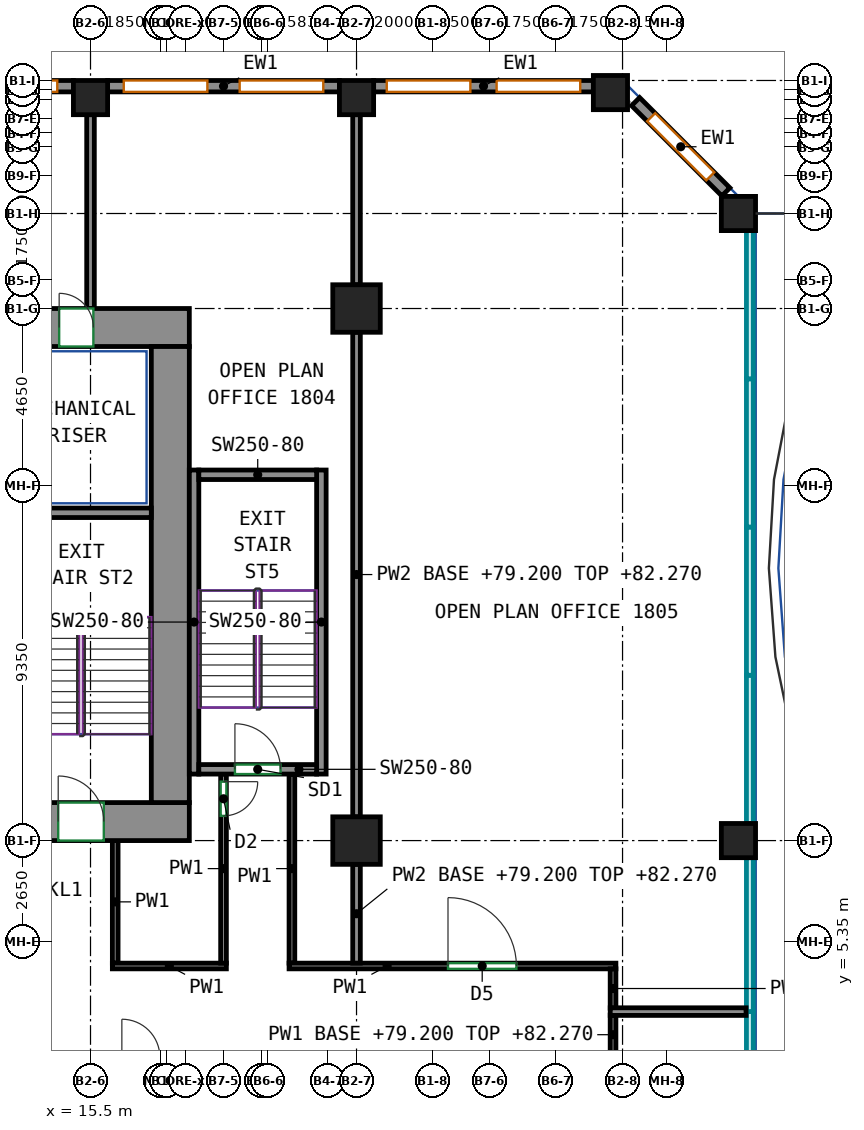
"""IFC4 building model, lengths in metres.
Left out: names, types, materials, properties, quantities, classifications, styles, units other than length and angle.
Written with IfcOpenShell. Run it as: python <this file> out.ifc"""

import sys

from ifc_helpers import new_model, si_unit, direction, frame, frame_2d, origin, origin_2d, place, context, subcontext, project, spatial, rectangle, extrude, source, transform, mapped, element, fill, save


model = new_model("IFC4")
c1 = context("Model", 3, precision=1e-05, world=origin(), true_north=direction((0.0, 1.0)))
c2 = subcontext(c1, "Body", "Model", "MODEL_VIEW")
j1 = project(units=[si_unit("LENGTHUNIT", "METRE"), si_unit("PLANEANGLEUNIT", "RADIAN")], contexts=[c1])
p1 = place(None, origin())
s1 = spatial("IfcSite", under=j1, at=p1, CompositionType="ELEMENT")
p2 = place(p1, origin())
s2 = spatial("IfcBuilding", under=s1, at=p2, CompositionType="ELEMENT")
p3 = place(p2, frame((0.0, 0.0, 79.2)))
s3 = spatial("IfcBuildingStorey", under=s2, at=p3, CompositionType="ELEMENT", Elevation=79.2)
m1 = source(origin(), c2, "Body", "SweptSolid", [
    extrude(rectangle(XDim=0.9, YDim=0.9, at=origin_2d()), origin(), (0.0, 0.0, 1.0), 3.72),
])
p4 = place(p3, frame((15.5, 27.55, 0.0), z_axis=(0.0, 0.0, 1.0), x_axis=(1.0, 0.0, 0.0)))
e1 = element("IfcColumn", 1, at=p4, inside=s3, PredefinedType="COLUMN", context=c2, shape_type="MappedRepresentation", body=[
    mapped(m1, transform((0.0, 0.0, 0.0))),
])
m2 = source(origin(), c2, "Body", "SweptSolid", [
    extrude(rectangle(XDim=1.25, YDim=1.25, at=origin_2d()), origin(), (0.0, 0.0, 1.0), 3.72),
])
for number, where, z_axis, x_axis in (
    (2, (22.5, 8.0, 0.0), (0.0, 0.0, 1.0), (1.0, 0.0, 0.0)),
    (3, (22.5, 22.0, 0.0), (0.0, 0.0, 1.0), (1.0, 0.0, 0.0)),
):
    element("IfcColumn", number, at=place(p3, frame(where, z_axis=z_axis, x_axis=x_axis)), inside=s3, PredefinedType="COLUMN", context=c2, shape_type="MappedRepresentation", body=[
        mapped(m2, transform((0.0, 0.0, 0.0))),
    ])
for number, where, z_axis, x_axis in (
    (4, (22.5, 27.55, 0.0), (0.0, 0.0, 1.0), (1.0, 0.0, 0.0)),
    (5, (29.182, 27.682, 0.0), (0.0, 0.0, 1.0), (1.0, 0.0, 0.0)),
    (6, (32.55, 8.0, 0.0), (0.0, 0.0, 1.0), (1.0, 0.0, 0.0)),
    (7, (32.55, 24.5, 0.0), (0.0, 0.0, 1.0), (1.0, 0.0, 0.0)),
):
    element("IfcColumn", number, at=place(p3, frame(where, z_axis=z_axis, x_axis=x_axis)), inside=s3, PredefinedType="COLUMN", context=c2, shape_type="MappedRepresentation", body=[
        mapped(m1, transform((0.0, 0.0, 0.0))),
    ])
m3 = source(origin(), c2, "Body", "SweptSolid", [
    extrude(rectangle(XDim=5.63, YDim=1.0, at=frame_2d((2.815, 0.0))), origin(), (0.0, 0.0, 1.0), 3.72),
])
p5 = place(p3, frame((12.47, 8.5, 0.0), z_axis=(0.0, 0.0, 1.0), x_axis=(1.0, 0.0, 0.0)))
e8 = element("IfcWall", 8, at=p5, inside=s3, PredefinedType="SHEAR", context=c2, shape_type="MappedRepresentation", body=[
    mapped(m3, transform((0.0, 0.0, 0.0))),
])
p6 = place(p5, frame((2.18, 0.0, 0.0)))
e9 = element("IfcOpeningElement", 9, at=p6, cuts=e8, PredefinedType="OPENING", context=c2, shape_type="SweptSolid", body=[
    extrude(rectangle(XDim=1.2, YDim=2.1, at=frame_2d((0.6, 1.05))), frame((0.0, 0.51, 0.0), z_axis=(0.0, -1.0, 0.0), x_axis=(1.0, 0.0, 0.0)), (0.0, 0.0, 1.0), 1.02),
])
m4 = source(origin(), c2, "Body", "SweptSolid", [
    extrude(rectangle(XDim=34.1, YDim=1.0, at=frame_2d((17.05, 0.0))), origin(), (0.0, 0.0, 1.0), 3.72),
])
p7 = place(p3, frame((-16.0, 21.5, 0.0), z_axis=(0.0, 0.0, 1.0), x_axis=(1.0, 0.0, 0.0)))
e10 = element("IfcWall", 10, at=p7, inside=s3, PredefinedType="SHEAR", context=c2, shape_type="MappedRepresentation", body=[
    mapped(m4, transform((0.0, 0.0, 0.0))),
])
p8 = place(p7, frame((8.52, 0.0, 0.0)))
e11 = element("IfcOpeningElement", 11, at=p8, cuts=e10, PredefinedType="OPENING", context=c2, shape_type="SweptSolid", body=[
    extrude(rectangle(XDim=0.9, YDim=2.1, at=frame_2d((0.45, 1.05))), frame((0.0, 0.51, 0.0), z_axis=(0.0, -1.0, 0.0), x_axis=(1.0, 0.0, 0.0)), (0.0, 0.0, 1.0), 1.02),
])
p9 = place(p7, frame((14.55, 0.0, 0.0)))
e12 = element("IfcOpeningElement", 12, at=p9, cuts=e10, PredefinedType="OPENING", context=c2, shape_type="SweptSolid", body=[
    extrude(rectangle(XDim=0.9, YDim=2.1, at=frame_2d((0.45, 1.05))), frame((0.0, 0.51, 0.0), z_axis=(0.0, -1.0, 0.0), x_axis=(1.0, 0.0, 0.0)), (0.0, 0.0, 1.0), 1.02),
])
p10 = place(p7, frame((19.374, 0.0, 0.0)))
e13 = element("IfcOpeningElement", 13, at=p10, cuts=e10, PredefinedType="OPENING", context=c2, shape_type="SweptSolid", body=[
    extrude(rectangle(XDim=0.9, YDim=2.1, at=frame_2d((0.45, 1.05))), frame((0.0, 0.51, 0.0), z_axis=(0.0, -1.0, 0.0), x_axis=(1.0, 0.0, 0.0)), (0.0, 0.0, 1.0), 1.02),
])
p11 = place(p7, frame((25.404, 0.0, 0.0)))
e14 = element("IfcOpeningElement", 14, at=p11, cuts=e10, PredefinedType="OPENING", context=c2, shape_type="SweptSolid", body=[
    extrude(rectangle(XDim=0.9, YDim=2.1, at=frame_2d((0.45, 1.05))), frame((0.0, 0.51, 0.0), z_axis=(0.0, -1.0, 0.0), x_axis=(1.0, 0.0, 0.0)), (0.0, 0.0, 1.0), 1.02),
])
p12 = place(p7, frame((2.525, 0.0, 0.0)))
e15 = element("IfcOpeningElement", 15, at=p12, cuts=e10, PredefinedType="OPENING", context=c2, shape_type="SweptSolid", body=[
    extrude(rectangle(XDim=0.9, YDim=2.1, at=frame_2d((0.45, 1.05))), frame((0.0, 0.51, 0.0), z_axis=(0.0, -1.0, 0.0), x_axis=(1.0, 0.0, 0.0)), (0.0, 0.0, 1.0), 1.02),
])
p13 = place(p7, frame((30.675, 0.0, 0.0)))
e16 = element("IfcOpeningElement", 16, at=p13, cuts=e10, PredefinedType="OPENING", context=c2, shape_type="SweptSolid", body=[
    extrude(rectangle(XDim=0.9, YDim=2.1, at=frame_2d((0.45, 1.05))), frame((0.0, 0.51, 0.0), z_axis=(0.0, -1.0, 0.0), x_axis=(1.0, 0.0, 0.0)), (0.0, 0.0, 1.0), 1.02),
])
m5 = source(origin(), c2, "Body", "SweptSolid", [
    extrude(rectangle(XDim=12.0, YDim=1.0, at=frame_2d((6.0, 0.0))), origin(), (0.0, 0.0, 1.0), 3.72),
])
p14 = place(p3, frame((17.6, 9.0, 0.0), z_axis=(0.0, 0.0, 1.0), x_axis=(0.0, 1.0, 0.0)))
e17 = element("IfcWall", 17, at=p14, inside=s3, PredefinedType="SHEAR", context=c2, shape_type="MappedRepresentation", body=[
    mapped(m5, transform((0.0, 0.0, 0.0))),
])
m6 = source(origin(), c2, "Body", "SweptSolid", [
    extrude(rectangle(XDim=3.7, YDim=0.25, at=frame_2d((1.85, 0.0))), origin(), (0.0, 0.0, 1.0), 3.72),
])
p15 = place(p3, frame((13.4, 16.625, 0.0), z_axis=(0.0, 0.0, 1.0), x_axis=(1.0, 0.0, 0.0)))
e18 = element("IfcWall", 18, at=p15, inside=s3, PredefinedType="SHEAR", context=c2, shape_type="MappedRepresentation", body=[
    mapped(m6, transform((0.0, 0.0, 0.0))),
])
m7 = source(origin(), c2, "Body", "SweptSolid", [
    extrude(rectangle(XDim=8.0, YDim=0.25, at=frame_2d((4.0, 0.0))), origin(), (0.0, 0.0, 1.0), 3.72),
])
for number, where, z_axis, x_axis in (
    (19, (18.225, 9.75, 0.0), (0.0, 0.0, 1.0), (0.0, 1.0, 0.0)),
    (20, (21.575, 9.75, 0.0), (0.0, 0.0, 1.0), (0.0, 1.0, 0.0)),
):
    element("IfcWall", number, at=place(p3, frame(where, z_axis=z_axis, x_axis=x_axis)), inside=s3, PredefinedType="SHEAR", context=c2, shape_type="MappedRepresentation", body=[
        mapped(m7, transform((0.0, 0.0, 0.0))),
    ])
m8 = source(origin(), c2, "Body", "SweptSolid", [
    extrude(rectangle(XDim=3.1, YDim=0.25, at=frame_2d((1.55, 0.0))), origin(), (0.0, 0.0, 1.0), 3.72),
])
p16 = place(p3, frame((18.35, 9.875, 0.0), z_axis=(0.0, 0.0, 1.0), x_axis=(1.0, 0.0, 0.0)))
e21 = element("IfcWall", 21, at=p16, inside=s3, PredefinedType="SHEAR", context=c2, shape_type="MappedRepresentation", body=[
    mapped(m8, transform((0.0, 0.0, 0.0))),
])
p17 = place(p16, frame((0.95, 0.0, 0.0)))
e22 = element("IfcOpeningElement", 22, at=p17, cuts=e21, PredefinedType="OPENING", context=c2, shape_type="SweptSolid", body=[
    extrude(rectangle(XDim=1.2, YDim=2.1, at=frame_2d((0.6, 1.05))), frame((0.0, 0.135, 0.0), z_axis=(0.0, -1.0, 0.0), x_axis=(1.0, 0.0, 0.0)), (0.0, 0.0, 1.0), 0.27),
])
p18 = place(p3, frame((18.35, 17.625, 0.0), z_axis=(0.0, 0.0, 1.0), x_axis=(1.0, 0.0, 0.0)))
e23 = element("IfcWall", 23, at=p18, inside=s3, PredefinedType="SHEAR", context=c2, shape_type="MappedRepresentation", body=[
    mapped(m8, transform((0.0, 0.0, 0.0))),
])
m9 = source(origin(), c2, "Body", "SweptSolid", [
    extrude(rectangle(XDim=3.359, YDim=0.3, at=frame_2d((1.679, 0.0))), origin(), (0.0, 0.0, 1.0), 3.72),
])
p19 = place(p3, frame((32.219, 25.069, 0.0), z_axis=(0.0, 0.0, 1.0), x_axis=(-0.707070438228, 0.707143122278, 0.0)))
e24 = element("IfcWall", 24, at=p19, inside=s3, PredefinedType="SOLIDWALL", context=c2, shape_type="MappedRepresentation", body=[
    mapped(m9, transform((0.0, 0.0, 0.0))),
])
p20 = place(p19, frame((0.579, 0.0, 0.7)))
e25 = element("IfcOpeningElement", 25, at=p20, cuts=e24, PredefinedType="OPENING", context=c2, shape_type="SweptSolid", body=[
    extrude(rectangle(XDim=2.2, YDim=2.25, at=frame_2d((1.1, 1.125))), frame((0.0, 0.16, 0.0), z_axis=(0.0, -1.0, 0.0), x_axis=(1.0, 0.0, 0.0)), (0.0, 0.0, 1.0), 0.32),
])
m10 = source(origin(), c2, "Body", "SweptSolid", [
    extrude(rectangle(XDim=5.782, YDim=0.3, at=frame_2d((2.891, 0.0))), origin(), (0.0, 0.0, 1.0), 3.72),
])
p21 = place(p3, frame((28.732, 27.85, 0.0), z_axis=(0.0, 0.0, 1.0), x_axis=(-1.0, 0.0, 0.0)))
e26 = element("IfcWall", 26, at=p21, inside=s3, PredefinedType="SOLIDWALL", context=c2, shape_type="MappedRepresentation", body=[
    mapped(m10, transform((0.0, 0.0, 0.0))),
])
p22 = place(p21, frame((0.345, 0.0, 0.7)))
e27 = element("IfcOpeningElement", 27, at=p22, cuts=e26, PredefinedType="OPENING", context=c2, shape_type="SweptSolid", body=[
    extrude(rectangle(XDim=2.2, YDim=2.25, at=frame_2d((1.1, 1.125))), frame((0.0, 0.16, 0.0), z_axis=(0.0, -1.0, 0.0), x_axis=(1.0, 0.0, 0.0)), (0.0, 0.0, 1.0), 0.32),
])
p23 = place(p21, frame((3.236, 0.0, 0.7)))
e28 = element("IfcOpeningElement", 28, at=p23, cuts=e26, PredefinedType="OPENING", context=c2, shape_type="SweptSolid", body=[
    extrude(rectangle(XDim=2.2, YDim=2.25, at=frame_2d((1.1, 1.125))), frame((0.0, 0.16, 0.0), z_axis=(0.0, -1.0, 0.0), x_axis=(1.0, 0.0, 0.0)), (0.0, 0.0, 1.0), 0.32),
])
m11 = source(origin(), c2, "Body", "SweptSolid", [
    extrude(rectangle(XDim=6.1, YDim=0.3, at=frame_2d((3.05, 0.0))), origin(), (0.0, 0.0, 1.0), 3.72),
])
p24 = place(p3, frame((22.05, 27.85, 0.0), z_axis=(0.0, 0.0, 1.0), x_axis=(-1.0, 0.0, 0.0)))
e29 = element("IfcWall", 29, at=p24, inside=s3, PredefinedType="SOLIDWALL", context=c2, shape_type="MappedRepresentation", body=[
    mapped(m11, transform((0.0, 0.0, 0.0))),
])
p25 = place(p24, frame((0.425, 0.0, 0.7)))
e30 = element("IfcOpeningElement", 30, at=p25, cuts=e29, PredefinedType="OPENING", context=c2, shape_type="SweptSolid", body=[
    extrude(rectangle(XDim=2.2, YDim=2.25, at=frame_2d((1.1, 1.125))), frame((0.0, 0.16, 0.0), z_axis=(0.0, -1.0, 0.0), x_axis=(1.0, 0.0, 0.0)), (0.0, 0.0, 1.0), 0.32),
])
p26 = place(p24, frame((3.475, 0.0, 0.7)))
e31 = element("IfcOpeningElement", 31, at=p26, cuts=e29, PredefinedType="OPENING", context=c2, shape_type="SweptSolid", body=[
    extrude(rectangle(XDim=2.2, YDim=2.25, at=frame_2d((1.1, 1.125))), frame((0.0, 0.16, 0.0), z_axis=(0.0, -1.0, 0.0), x_axis=(1.0, 0.0, 0.0)), (0.0, 0.0, 1.0), 0.32),
])
p27 = place(p3, frame((15.05, 27.85, 0.0), z_axis=(0.0, 0.0, 1.0), x_axis=(-1.0, 0.0, 0.0)))
e32 = element("IfcWall", 32, at=p27, inside=s3, PredefinedType="SOLIDWALL", context=c2, shape_type="MappedRepresentation", body=[
    mapped(m11, transform((0.0, 0.0, 0.0))),
])
p28 = place(p27, frame((0.425, 0.0, 0.7)))
e33 = element("IfcOpeningElement", 33, at=p28, cuts=e32, PredefinedType="OPENING", context=c2, shape_type="SweptSolid", body=[
    extrude(rectangle(XDim=2.2, YDim=2.25, at=frame_2d((1.1, 1.125))), frame((0.0, 0.16, 0.0), z_axis=(0.0, -1.0, 0.0), x_axis=(1.0, 0.0, 0.0)), (0.0, 0.0, 1.0), 0.32),
])
p29 = place(p27, frame((3.475, 0.0, 0.7)))
e34 = element("IfcOpeningElement", 34, at=p29, cuts=e32, PredefinedType="OPENING", context=c2, shape_type="SweptSolid", body=[
    extrude(rectangle(XDim=2.2, YDim=2.25, at=frame_2d((1.1, 1.125))), frame((0.0, 0.16, 0.0), z_axis=(0.0, -1.0, 0.0), x_axis=(1.0, 0.0, 0.0)), (0.0, 0.0, 1.0), 0.32),
])
p30 = place(p3, frame((16.15, 4.775, 0.0), z_axis=(0.0, 0.0, 1.0), x_axis=(0.0, 1.0, 0.0)))
e35 = element("IfcWall", 35, at=p30, inside=s3, PredefinedType="PARTITIONING", context=c2, shape_type="SweptSolid", body=[
    extrude(rectangle(XDim=3.225, YDim=0.15, at=frame_2d((1.613, 0.0))), origin(), (0.0, 0.0, 1.0), 3.72),
])
p31 = place(p3, frame((16.075, 4.7, 0.0), z_axis=(0.0, 0.0, 1.0), x_axis=(1.0, 0.0, 0.0)))
e36 = element("IfcWall", 36, at=p31, inside=s3, PredefinedType="PARTITIONING", context=c2, shape_type="SweptSolid", body=[
    extrude(rectangle(XDim=3.0, YDim=0.15, at=frame_2d((1.5, 0.0))), origin(), (0.0, 0.0, 1.0), 3.72),
])
p32 = place(p3, frame((19.0, 9.75, 0.0), z_axis=(0.0, 0.0, 1.0), x_axis=(0.0, -1.0, 0.0)))
e37 = element("IfcWall", 37, at=p32, inside=s3, PredefinedType="PARTITIONING", context=c2, shape_type="SweptSolid", body=[
    extrude(rectangle(XDim=4.975, YDim=0.15, at=frame_2d((2.488, 0.0))), origin(), (0.0, 0.0, 1.0), 3.72),
])
p33 = place(p32, frame((0.2, 0.0, 0.0)))
e38 = element("IfcOpeningElement", 38, at=p33, cuts=e37, PredefinedType="OPENING", context=c2, shape_type="SweptSolid", body=[
    extrude(rectangle(XDim=0.9, YDim=2.1, at=frame_2d((0.45, 1.05))), frame((0.0, 0.085, 0.0), z_axis=(0.0, -1.0, 0.0), x_axis=(1.0, 0.0, 0.0)), (0.0, 0.0, 1.0), 0.17),
])
p34 = place(p3, frame((20.8, 4.775, 0.0), z_axis=(0.0, 0.0, 1.0), x_axis=(0.0, 1.0, 0.0)))
e39 = element("IfcWall", 39, at=p34, inside=s3, PredefinedType="PARTITIONING", context=c2, shape_type="SweptSolid", body=[
    extrude(rectangle(XDim=4.975, YDim=0.15, at=frame_2d((2.488, 0.0))), origin(), (0.0, 0.0, 1.0), 3.72),
])
p35 = place(p3, frame((20.725, 4.7, 0.0), z_axis=(0.0, 0.0, 1.0), x_axis=(1.0, 0.0, 0.0)))
e40 = element("IfcWall", 40, at=p35, inside=s3, PredefinedType="PARTITIONING", context=c2, shape_type="SweptSolid", body=[
    extrude(rectangle(XDim=8.6, YDim=0.15, at=frame_2d((4.3, 0.0))), origin(), (0.0, 0.0, 1.0), 3.72),
])
p36 = place(p35, frame((4.182, 0.0, 0.0)))
e41 = element("IfcOpeningElement", 41, at=p36, cuts=e40, PredefinedType="OPENING", context=c2, shape_type="SweptSolid", body=[
    extrude(rectangle(XDim=1.8, YDim=2.1, at=frame_2d((0.9, 1.05))), frame((0.0, 0.085, 0.0), z_axis=(0.0, -1.0, 0.0), x_axis=(1.0, 0.0, 0.0)), (0.0, 0.0, 1.0), 0.17),
])
for number, where, z_axis, x_axis in (
    (42, (29.25, 3.59, 0.0), (0.0, 0.0, 1.0), (0.0, 1.0, 0.0)),
    (43, (29.25, 2.375, 0.0), (0.0, 0.0, 1.0), (0.0, 1.0, 0.0)),
):
    element("IfcWall", number, at=place(p3, frame(where, z_axis=z_axis, x_axis=x_axis)), inside=s3, PredefinedType="PARTITIONING", context=c2, shape_type="SweptSolid", body=[
        extrude(rectangle(XDim=1.035, YDim=0.15, at=frame_2d((0.518, 0.0))), origin(), (0.0, 0.0, 1.0), 3.07),
    ])
p37 = place(p3, frame((15.5, 22.0, 0.0), z_axis=(0.0, 0.0, 1.0), x_axis=(0.0, 1.0, 0.0)))
e44 = element("IfcWall", 44, at=p37, inside=s3, PredefinedType="PARTITIONING", context=c2, shape_type="SweptSolid", body=[
    extrude(rectangle(XDim=5.1, YDim=0.2, at=frame_2d((2.55, 0.0))), origin(), (0.0, 0.0, 1.0), 3.72),
])
p38 = place(p3, frame((22.5, 22.625, 0.0), z_axis=(0.0, 0.0, 1.0), x_axis=(0.0, 1.0, 0.0)))
e45 = element("IfcWall", 45, at=p38, inside=s3, PredefinedType="PARTITIONING", context=c2, shape_type="SweptSolid", body=[
    extrude(rectangle(XDim=4.475, YDim=0.2, at=frame_2d((2.238, 0.0))), origin(), (0.0, 0.0, 1.0), 3.72),
])
p39 = place(p3, frame((22.5, 8.625, 0.0), z_axis=(0.0, 0.0, 1.0), x_axis=(0.0, 1.0, 0.0)))
e46 = element("IfcWall", 46, at=p39, inside=s3, PredefinedType="PARTITIONING", context=c2, shape_type="SweptSolid", body=[
    extrude(rectangle(XDim=12.75, YDim=0.2, at=frame_2d((6.375, 0.0))), origin(), (0.0, 0.0, 1.0), 3.07),
])
p40 = place(p3, frame((22.5, 4.776, 0.0), z_axis=(0.0, 0.0, 1.0), x_axis=(0.0, 1.0, 0.0)))
e47 = element("IfcWall", 47, at=p40, inside=s3, PredefinedType="PARTITIONING", context=c2, shape_type="SweptSolid", body=[
    extrude(rectangle(XDim=2.599, YDim=0.2, at=frame_2d((1.3, 0.0))), origin(), (0.0, 0.0, 1.0), 3.07),
])
p41 = place(p3, frame((29.176, 3.5, 0.0), z_axis=(0.0, 0.0, 1.0), x_axis=(1.0, 0.0, 0.0)))
e48 = element("IfcWall", 48, at=p41, inside=s3, PredefinedType="PARTITIONING", context=c2, shape_type="SweptSolid", body=[
    extrude(rectangle(XDim=3.574, YDim=0.2, at=frame_2d((1.787, 0.0))), origin(), (0.0, 0.0, 1.0), 3.72),
])
p42 = place(p20, origin())
e49 = element("IfcWindow", 49, at=p42, inside=s3, PartitioningType="SINGLE_PANEL", PredefinedType="WINDOW", context=c2, shape_type="SweptSolid", body=[
    extrude(rectangle(XDim=2.2, YDim=2.25, at=frame_2d((1.1, 1.125))), frame((0.0, 0.03, 0.0), z_axis=(0.0, -1.0, 0.0), x_axis=(1.0, 0.0, 0.0)), (0.0, 0.0, 1.0), 0.06),
])
fill(e25, e49)
p43 = place(p22, origin())
e50 = element("IfcWindow", 50, at=p43, inside=s3, PartitioningType="SINGLE_PANEL", PredefinedType="WINDOW", context=c2, shape_type="SweptSolid", body=[
    extrude(rectangle(XDim=2.2, YDim=2.25, at=frame_2d((1.1, 1.125))), frame((0.0, 0.03, 0.0), z_axis=(0.0, -1.0, 0.0), x_axis=(1.0, 0.0, 0.0)), (0.0, 0.0, 1.0), 0.06),
])
fill(e27, e50)
p44 = place(p23, origin())
e51 = element("IfcWindow", 51, at=p44, inside=s3, PartitioningType="SINGLE_PANEL", PredefinedType="WINDOW", context=c2, shape_type="SweptSolid", body=[
    extrude(rectangle(XDim=2.2, YDim=2.25, at=frame_2d((1.1, 1.125))), frame((0.0, 0.03, 0.0), z_axis=(0.0, -1.0, 0.0), x_axis=(1.0, 0.0, 0.0)), (0.0, 0.0, 1.0), 0.06),
])
fill(e28, e51)
p45 = place(p25, origin())
e52 = element("IfcWindow", 52, at=p45, inside=s3, PartitioningType="SINGLE_PANEL", PredefinedType="WINDOW", context=c2, shape_type="SweptSolid", body=[
    extrude(rectangle(XDim=2.2, YDim=2.25, at=frame_2d((1.1, 1.125))), frame((0.0, 0.03, 0.0), z_axis=(0.0, -1.0, 0.0), x_axis=(1.0, 0.0, 0.0)), (0.0, 0.0, 1.0), 0.06),
])
fill(e30, e52)
p46 = place(p26, origin())
e53 = element("IfcWindow", 53, at=p46, inside=s3, PartitioningType="SINGLE_PANEL", PredefinedType="WINDOW", context=c2, shape_type="SweptSolid", body=[
    extrude(rectangle(XDim=2.2, YDim=2.25, at=frame_2d((1.1, 1.125))), frame((0.0, 0.03, 0.0), z_axis=(0.0, -1.0, 0.0), x_axis=(1.0, 0.0, 0.0)), (0.0, 0.0, 1.0), 0.06),
])
fill(e31, e53)
p47 = place(p28, origin())
e54 = element("IfcWindow", 54, at=p47, inside=s3, PartitioningType="SINGLE_PANEL", PredefinedType="WINDOW", context=c2, shape_type="SweptSolid", body=[
    extrude(rectangle(XDim=2.2, YDim=2.25, at=frame_2d((1.1, 1.125))), frame((0.0, 0.03, 0.0), z_axis=(0.0, -1.0, 0.0), x_axis=(1.0, 0.0, 0.0)), (0.0, 0.0, 1.0), 0.06),
])
fill(e33, e54)
p48 = place(p13, origin())
e55 = element("IfcDoor", 55, at=p48, inside=s3, OperationType="SINGLE_SWING_LEFT", PredefinedType="DOOR", context=c2, shape_type="SweptSolid", body=[
    extrude(rectangle(XDim=0.9, YDim=2.1, at=frame_2d((0.45, 1.05))), frame((0.0, -0.355, 0.0), z_axis=(0.0, -1.0, 0.0), x_axis=(1.0, 0.0, 0.0)), (0.0, 0.0, 1.0), 0.05),
])
fill(e16, e55)
p49 = place(p6, origin())
e56 = element("IfcDoor", 56, at=p49, inside=s3, OperationType="DOUBLE_DOOR_SINGLE_SWING", PredefinedType="DOOR", context=c2, shape_type="SweptSolid", body=[
    extrude(rectangle(XDim=1.2, YDim=2.1, at=frame_2d((0.6, 1.05))), frame((0.0, 0.405, 0.0), z_axis=(0.0, -1.0, 0.0), x_axis=(1.0, 0.0, 0.0)), (0.0, 0.0, 1.0), 0.05),
])
fill(e9, e56)
p50 = place(p17, origin())
e57 = element("IfcDoor", 57, at=p50, inside=s3, OperationType="DOUBLE_DOOR_SINGLE_SWING", PredefinedType="DOOR", context=c2, shape_type="SweptSolid", body=[
    extrude(rectangle(XDim=1.2, YDim=2.1, at=frame_2d((0.6, 1.05))), frame((0.0, 0.025, 0.0), z_axis=(0.0, -1.0, 0.0), x_axis=(1.0, 0.0, 0.0)), (0.0, 0.0, 1.0), 0.05),
])
fill(e22, e57)
p51 = place(p36, origin())
e58 = element("IfcDoor", 58, at=p51, inside=s3, OperationType="DOUBLE_DOOR_SINGLE_SWING", PredefinedType="DOOR", context=c2, shape_type="SweptSolid", body=[
    extrude(rectangle(XDim=1.8, YDim=2.1, at=frame_2d((0.9, 1.05))), frame((0.0, 0.025, 0.0), z_axis=(0.0, -1.0, 0.0), x_axis=(1.0, 0.0, 0.0)), (0.0, 0.0, 1.0), 0.05),
])
fill(e41, e58)
p52 = place(p33, origin())
e59 = element("IfcDoor", 59, at=p52, inside=s3, OperationType="SINGLE_SWING_LEFT", PredefinedType="DOOR", context=c2, shape_type="SweptSolid", body=[
    extrude(rectangle(XDim=0.9, YDim=2.1, at=frame_2d((0.45, 1.05))), frame((0.0, 0.025, 0.0), z_axis=(0.0, -1.0, 0.0), x_axis=(1.0, 0.0, 0.0)), (0.0, 0.0, 1.0), 0.05),
])
fill(e38, e59)
save(model, sys.argv[1])
